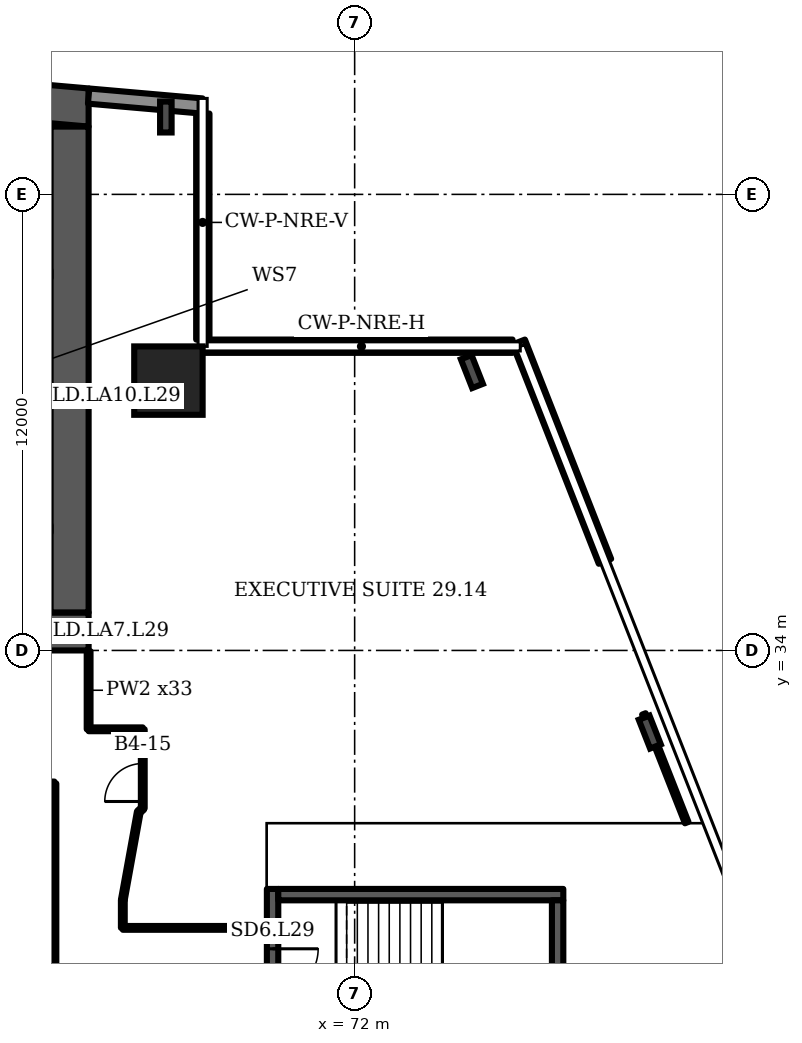
"""IFC4 building model, lengths in metres.
Left out: names, types, materials, properties, quantities, classifications, styles, units other than length and angle.
Written with IfcOpenShell. Run it as: python <this file> out.ifc"""

import sys

from ifc_helpers import new_model, si_unit, direction, frame, frame_2d, origin, origin_2d, place, context, subcontext, project, spatial, polyline, rectangle, i_section, outline, extrude, element, fill, save


model = new_model("IFC4")
c1 = context("Model", 3, precision=1e-05, world=origin(), true_north=direction((0.0, 1.0)))
c2 = subcontext(c1, "Body", "Model", "MODEL_VIEW")
j1 = project(units=[si_unit("LENGTHUNIT", "METRE"), si_unit("PLANEANGLEUNIT", "RADIAN")], contexts=[c1])
p1 = place(None, origin())
s1 = spatial("IfcSite", under=j1, at=p1, CompositionType="ELEMENT")
p2 = place(p1, origin())
s2 = spatial("IfcBuilding", under=s1, at=p2, CompositionType="ELEMENT")
p3 = place(p2, frame((0.0, 0.0, 125.5)))
s3 = spatial("IfcBuildingStorey", under=s2, at=p3, CompositionType="ELEMENT", Elevation=125.5)
p4 = place(p3, origin())
e1 = element("IfcWall", 1, at=p4, inside=s3, PredefinedType="SHEAR", context=c2, shape_type="SweptSolid", body=[
    extrude(outline(polyline([(16.0, 47.784), (40.5, 49.927), (65.0, 47.784), (65.0, 48.787), (40.5, 50.931), (16.0, 48.787), (16.0, 47.784)])), origin(), (0.0, 0.0, 1.0), 3.6),
])
p5 = place(p3, frame((16.0, 34.5, 0.0), z_axis=(0.0, 0.0, 1.0), x_axis=(1.0, 0.0, 0.0)))
e2 = element("IfcWall", 2, at=p5, inside=s3, PredefinedType="SHEAR", context=c2, shape_type="SweptSolid", body=[
    extrude(rectangle(XDim=49.0, YDim=1.0, at=frame_2d((24.5, 0.0))), origin(), (0.0, 0.0, 1.0), 3.6),
])
p6 = place(p5, frame((1.2, 0.0, 0.0)))
e3 = element("IfcOpeningElement", 3, at=p6, cuts=e2, PredefinedType="OPENING", context=c2, shape_type="SweptSolid", body=[
    extrude(rectangle(XDim=1.1, YDim=2.1, at=frame_2d((0.55, 1.05))), frame((0.0, 0.51, 0.0), z_axis=(0.0, -1.0, 0.0), x_axis=(1.0, 0.0, 0.0)), (0.0, 0.0, 1.0), 1.02),
])
p7 = place(p5, frame((5.083, 0.0, 0.0)))
e4 = element("IfcOpeningElement", 4, at=p7, cuts=e2, PredefinedType="OPENING", context=c2, shape_type="SweptSolid", body=[
    extrude(rectangle(XDim=1.1, YDim=2.1, at=frame_2d((0.55, 1.05))), frame((0.0, 0.51, 0.0), z_axis=(0.0, -1.0, 0.0), x_axis=(1.0, 0.0, 0.0)), (0.0, 0.0, 1.0), 1.02),
])
p8 = place(p5, frame((2.933, 0.0, 0.0)))
e5 = element("IfcOpeningElement", 5, at=p8, cuts=e2, PredefinedType="OPENING", context=c2, shape_type="SweptSolid", body=[
    extrude(rectangle(XDim=1.4, YDim=2.1, at=frame_2d((0.7, 1.05))), frame((0.0, 0.51, 0.0), z_axis=(0.0, -1.0, 0.0), x_axis=(1.0, 0.0, 0.0)), (0.0, 0.0, 1.0), 1.02),
])
p9 = place(p5, frame((7.65, 0.0, 0.0)))
e6 = element("IfcOpeningElement", 6, at=p9, cuts=e2, PredefinedType="OPENING", context=c2, shape_type="SweptSolid", body=[
    extrude(rectangle(XDim=1.2, YDim=2.1, at=frame_2d((0.6, 1.05))), frame((0.0, 0.51, 0.0), z_axis=(0.0, -1.0, 0.0), x_axis=(1.0, 0.0, 0.0)), (0.0, 0.0, 1.0), 1.02),
])
p10 = place(p5, frame((14.817, 0.0, 0.0)))
e7 = element("IfcOpeningElement", 7, at=p10, cuts=e2, PredefinedType="OPENING", context=c2, shape_type="SweptSolid", body=[
    extrude(rectangle(XDim=1.1, YDim=2.1, at=frame_2d((0.55, 1.05))), frame((0.0, 0.51, 0.0), z_axis=(0.0, -1.0, 0.0), x_axis=(1.0, 0.0, 0.0)), (0.0, 0.0, 1.0), 1.02),
])
p11 = place(p5, frame((19.083, 0.0, 0.0)))
e8 = element("IfcOpeningElement", 8, at=p11, cuts=e2, PredefinedType="OPENING", context=c2, shape_type="SweptSolid", body=[
    extrude(rectangle(XDim=1.1, YDim=2.1, at=frame_2d((0.55, 1.05))), frame((0.0, 0.51, 0.0), z_axis=(0.0, -1.0, 0.0), x_axis=(1.0, 0.0, 0.0)), (0.0, 0.0, 1.0), 1.02),
])
p12 = place(p5, frame((16.8, 0.0, 0.0)))
e9 = element("IfcOpeningElement", 9, at=p12, cuts=e2, PredefinedType="OPENING", context=c2, shape_type="SweptSolid", body=[
    extrude(rectangle(XDim=1.4, YDim=2.1, at=frame_2d((0.7, 1.05))), frame((0.0, 0.51, 0.0), z_axis=(0.0, -1.0, 0.0), x_axis=(1.0, 0.0, 0.0)), (0.0, 0.0, 1.0), 1.02),
])
p13 = place(p5, frame((21.817, 0.0, 0.0)))
e10 = element("IfcOpeningElement", 10, at=p13, cuts=e2, PredefinedType="OPENING", context=c2, shape_type="SweptSolid", body=[
    extrude(rectangle(XDim=1.1, YDim=2.1, at=frame_2d((0.55, 1.05))), frame((0.0, 0.51, 0.0), z_axis=(0.0, -1.0, 0.0), x_axis=(1.0, 0.0, 0.0)), (0.0, 0.0, 1.0), 1.02),
])
p14 = place(p5, frame((26.083, 0.0, 0.0)))
e11 = element("IfcOpeningElement", 11, at=p14, cuts=e2, PredefinedType="OPENING", context=c2, shape_type="SweptSolid", body=[
    extrude(rectangle(XDim=1.1, YDim=2.1, at=frame_2d((0.55, 1.05))), frame((0.0, 0.51, 0.0), z_axis=(0.0, -1.0, 0.0), x_axis=(1.0, 0.0, 0.0)), (0.0, 0.0, 1.0), 1.02),
])
p15 = place(p5, frame((33.15, 0.0, 0.0)))
e12 = element("IfcOpeningElement", 12, at=p15, cuts=e2, PredefinedType="OPENING", context=c2, shape_type="SweptSolid", body=[
    extrude(rectangle(XDim=1.2, YDim=2.1, at=frame_2d((0.6, 1.05))), frame((0.0, 0.51, 0.0), z_axis=(0.0, -1.0, 0.0), x_axis=(1.0, 0.0, 0.0)), (0.0, 0.0, 1.0), 1.02),
])
p16 = place(p5, frame((37.8, 0.0, 0.0)))
e13 = element("IfcOpeningElement", 13, at=p16, cuts=e2, PredefinedType="OPENING", context=c2, shape_type="SweptSolid", body=[
    extrude(rectangle(XDim=1.4, YDim=2.1, at=frame_2d((0.7, 1.05))), frame((0.0, 0.51, 0.0), z_axis=(0.0, -1.0, 0.0), x_axis=(1.0, 0.0, 0.0)), (0.0, 0.0, 1.0), 1.02),
])
p17 = place(p5, frame((42.817, 0.0, 0.0)))
e14 = element("IfcOpeningElement", 14, at=p17, cuts=e2, PredefinedType="OPENING", context=c2, shape_type="SweptSolid", body=[
    extrude(rectangle(XDim=1.1, YDim=2.1, at=frame_2d((0.55, 1.05))), frame((0.0, 0.51, 0.0), z_axis=(0.0, -1.0, 0.0), x_axis=(1.0, 0.0, 0.0)), (0.0, 0.0, 1.0), 1.02),
])
p18 = place(p5, frame((46.7, 0.0, 0.0)))
e15 = element("IfcOpeningElement", 15, at=p18, cuts=e2, PredefinedType="OPENING", context=c2, shape_type="SweptSolid", body=[
    extrude(rectangle(XDim=1.1, YDim=2.1, at=frame_2d((0.55, 1.05))), frame((0.0, 0.51, 0.0), z_axis=(0.0, -1.0, 0.0), x_axis=(1.0, 0.0, 0.0)), (0.0, 0.0, 1.0), 1.02),
])
p19 = place(p5, frame((44.667, 0.0, 0.0)))
e16 = element("IfcOpeningElement", 16, at=p19, cuts=e2, PredefinedType="OPENING", context=c2, shape_type="SweptSolid", body=[
    extrude(rectangle(XDim=1.4, YDim=2.1, at=frame_2d((0.7, 1.05))), frame((0.0, 0.51, 0.0), z_axis=(0.0, -1.0, 0.0), x_axis=(1.0, 0.0, 0.0)), (0.0, 0.0, 1.0), 1.02),
])
p20 = place(p3, frame((64.5, 35.0, 0.0), z_axis=(0.0, 0.0, 1.0), x_axis=(0.0, 1.0, 0.0)))
e17 = element("IfcWall", 17, at=p20, inside=s3, PredefinedType="SHEAR", context=c2, shape_type="SweptSolid", body=[
    extrude(rectangle(XDim=12.784, YDim=1.0, at=frame_2d((6.392, 0.0))), origin(), (0.0, 0.0, 1.0), 3.6),
])
p21 = place(p3, frame((67.1, 41.1, 0.0), z_axis=(0.0, 0.0, 1.0), x_axis=(1.0, 0.0, 0.0)))
e18 = element("IfcColumn", 18, at=p21, inside=s3, PredefinedType="COLUMN", context=c2, shape_type="SweptSolid", body=[
    extrude(rectangle(XDim=1.8, YDim=1.8, at=origin_2d()), origin(), (0.0, 0.0, 1.0), 3.6),
])
for number, where, z_axis, x_axis in (
    (19, (79.766, 31.853, 0.0), (0.0, 0.0, 1.0), (0.931, 0.366, 0.0)),
    (20, (75.085, 41.338, 0.0), (0.0, 0.0, 1.0), (0.931, 0.366, 0.0)),
    (21, (67.032, 48.036, 0.0), (0.0, 0.0, 1.0), (1.0, 0.0, 0.0)),
):
    element("IfcColumn", number, at=place(p3, frame(where, z_axis=z_axis, x_axis=x_axis)), inside=s3, PredefinedType="COLUMN", context=c2, shape_type="SweptSolid", body=[
        extrude(i_section(OverallWidth=0.303, OverallDepth=0.814, WebThickness=0.021, FlangeThickness=0.04, FilletRadius=0.03, at=origin_2d()), origin(), (0.0, 0.0, 1.0), 3.6),
    ])
p22 = place(p3, frame((67.983, 48.326, 0.0), z_axis=(0.0, 0.0, 1.0), x_axis=(-0.996194, 0.087168, 0.0)))
e22 = element("IfcWall", 22, at=p22, inside=s3, PredefinedType="SOLIDWALL", context=c2, shape_type="SweptSolid", body=[
    extrude(rectangle(XDim=2.994, YDim=0.4, at=frame_2d((1.497, 0.0))), origin(), (0.0, 0.0, 1.0), 3.2),
])
p23 = place(p3, frame((78.586, 36.344, 0.0), z_axis=(0.0, 0.0, 1.0), x_axis=(-0.365792, 0.930699, 0.0)))
e23 = element("IfcWall", 23, at=p23, inside=s3, PredefinedType="SOLIDWALL", context=c2, shape_type="SweptSolid", body=[
    extrude(rectangle(XDim=6.202, YDim=0.35, at=frame_2d((3.101, 0.0))), origin(), (0.0, 0.0, 1.0), 1.0),
])
p24 = place(p3, frame((76.155, 42.005, 0.0), z_axis=(0.0, 0.0, 1.0), x_axis=(-1.0, 0.0, 0.0)))
e24 = element("IfcWall", 24, at=p24, inside=s3, PredefinedType="SOLIDWALL", context=c2, shape_type="SweptSolid", body=[
    extrude(rectangle(XDim=8.155, YDim=0.35, at=frame_2d((4.078, 0.0))), origin(), (0.0, 0.0, 1.0), 1.0),
])
p25 = place(p3, frame((68.005, 42.18, 0.0), z_axis=(0.0, 0.0, 1.0), x_axis=(0.0, 1.0, 0.0)))
e25 = element("IfcWall", 25, at=p25, inside=s3, PredefinedType="SOLIDWALL", context=c2, shape_type="SweptSolid", body=[
    extrude(rectangle(XDim=5.947, YDim=0.35, at=frame_2d((2.973, 0.0))), origin(), (0.0, 0.0, 1.0), 1.0),
])
p26 = place(p3, frame((69.84, 23.375, 0.0), z_axis=(0.0, 0.0, 1.0), x_axis=(0.0, 1.0, 0.0)))
e26 = element("IfcWall", 26, at=p26, inside=s3, PredefinedType="SHEAR", context=c2, shape_type="SweptSolid", body=[
    extrude(rectangle(XDim=4.35, YDim=0.3, at=frame_2d((2.175, 0.0))), origin(), (0.0, 0.0, 1.0), 3.2),
])
p27 = place(p26, frame((1.575, 0.0, 0.0)))
e27 = element("IfcOpeningElement", 27, at=p27, cuts=e26, PredefinedType="OPENING", context=c2, shape_type="SweptSolid", body=[
    extrude(rectangle(XDim=1.2, YDim=2.1, at=frame_2d((0.6, 1.05))), frame((0.0, 0.16, 0.0), z_axis=(0.0, -1.0, 0.0), x_axis=(1.0, 0.0, 0.0)), (0.0, 0.0, 1.0), 0.32),
])
p28 = place(p3, frame((44.51, 30.5, 0.0), z_axis=(0.0, 0.0, 1.0), x_axis=(1.0, 0.0, 0.0)))
e28 = element("IfcWall", 28, at=p28, inside=s3, PredefinedType="PARTITIONING", context=c2, shape_type="SweptSolid", body=[
    extrude(rectangle(XDim=19.59, YDim=0.1, at=frame_2d((9.795, 0.0))), origin(), (0.0, 0.0, 1.0), 3.2),
])
p29 = place(p28, frame((6.41, 0.0, 0.0)))
e29 = element("IfcOpeningElement", 29, at=p29, cuts=e28, PredefinedType="OPENING", context=c2, shape_type="SweptSolid", body=[
    extrude(rectangle(XDim=1.0, YDim=2.1, at=frame_2d((0.5, 1.05))), frame((0.0, 0.06, 0.0), z_axis=(0.0, -1.0, 0.0), x_axis=(1.0, 0.0, 0.0)), (0.0, 0.0, 1.0), 0.12),
])
p30 = place(p28, frame((10.41, 0.0, 0.0)))
e30 = element("IfcOpeningElement", 30, at=p30, cuts=e28, PredefinedType="OPENING", context=c2, shape_type="SweptSolid", body=[
    extrude(rectangle(XDim=1.0, YDim=2.1, at=frame_2d((0.5, 1.05))), frame((0.0, 0.06, 0.0), z_axis=(0.0, -1.0, 0.0), x_axis=(1.0, 0.0, 0.0)), (0.0, 0.0, 1.0), 0.12),
])
p31 = place(p3, frame((64.1, 10.095, 0.0), z_axis=(0.0, 0.0, 1.0), x_axis=(0.0, 1.0, 0.0)))
e31 = element("IfcWall", 31, at=p31, inside=s3, PredefinedType="PARTITIONING", context=c2, shape_type="SweptSolid", body=[
    extrude(rectangle(XDim=20.405, YDim=0.1, at=frame_2d((10.203, 0.0))), origin(), (0.0, 0.0, 1.0), 3.2),
])
p32 = place(p31, frame((8.905, 0.0, 0.0)))
e32 = element("IfcOpeningElement", 32, at=p32, cuts=e31, PredefinedType="OPENING", context=c2, shape_type="SweptSolid", body=[
    extrude(rectangle(XDim=1.0, YDim=2.1, at=frame_2d((0.5, 1.05))), frame((0.0, 0.06, 0.0), z_axis=(0.0, -1.0, 0.0), x_axis=(1.0, 0.0, 0.0)), (0.0, 0.0, 1.0), 0.12),
])
p33 = place(p3, frame((65.0, 31.925, 0.0), z_axis=(0.0, 0.0, 1.0), x_axis=(0.0, 1.0, 0.0)))
e33 = element("IfcWall", 33, at=p33, inside=s3, PredefinedType="PARTITIONING", context=c2, shape_type="SweptSolid", body=[
    extrude(rectangle(XDim=2.055, YDim=0.1, at=frame_2d((1.027, 0.0))), origin(), (0.0, 0.0, 1.0), 3.2),
])
p34 = place(p3, frame((65.0, 31.925, 0.0), z_axis=(0.0, 0.0, 1.0), x_axis=(1.0, 0.0, 0.0)))
e34 = element("IfcWall", 34, at=p34, inside=s3, PredefinedType="PARTITIONING", context=c2, shape_type="SweptSolid", body=[
    extrude(rectangle(XDim=1.425, YDim=0.1, at=frame_2d((0.712, 0.0))), origin(), (0.0, 0.0, 1.0), 3.2),
])
p35 = place(p3, frame((65.9, 26.7, 0.0), z_axis=(0.0, 0.0, 1.0), x_axis=(0.0, 1.0, 0.0)))
e35 = element("IfcWall", 35, at=p35, inside=s3, PredefinedType="PARTITIONING", context=c2, shape_type="SweptSolid", body=[
    extrude(rectangle(XDim=0.735, YDim=0.1, at=frame_2d((0.368, 0.0))), origin(), (0.0, 0.0, 1.0), 3.2),
])
p36 = place(p3, frame((65.9, 26.7, 0.0), z_axis=(0.0, 0.0, 1.0), x_axis=(1.0, 0.0, 0.0)))
e36 = element("IfcWall", 36, at=p36, inside=s3, PredefinedType="PARTITIONING", context=c2, shape_type="SweptSolid", body=[
    extrude(rectangle(XDim=3.771, YDim=0.1, at=frame_2d((1.885, 0.0))), origin(), (0.0, 0.0, 1.0), 3.2),
])
p37 = place(p3, frame((65.9, 27.435, 0.0), z_axis=(0.0, 0.0, 1.0), x_axis=(0.178584, 0.983924, 0.0)))
e37 = element("IfcWall", 37, at=p37, inside=s3, PredefinedType="PARTITIONING", context=c2, shape_type="SweptSolid", body=[
    extrude(rectangle(XDim=2.353, YDim=0.1, at=frame_2d((1.176, 0.0))), origin(), (0.0, 0.0, 1.0), 3.2),
])
p38 = place(p3, frame((66.32, 29.75, 0.0), z_axis=(0.0, 0.0, 1.0), x_axis=(0.741581, 0.670872, 0.0)))
e38 = element("IfcWall", 38, at=p38, inside=s3, PredefinedType="PARTITIONING", context=c2, shape_type="SweptSolid", body=[
    extrude(rectangle(XDim=0.142, YDim=0.1, at=frame_2d((0.071, 0.0))), origin(), (0.0, 0.0, 1.0), 3.2),
])
p39 = place(p3, frame((66.425, 29.845, 0.0), z_axis=(0.0, 0.0, 1.0), x_axis=(0.0, 1.0, 0.0)))
e39 = element("IfcWall", 39, at=p39, inside=s3, PredefinedType="PARTITIONING", context=c2, shape_type="SweptSolid", body=[
    extrude(rectangle(XDim=2.08, YDim=0.1, at=frame_2d((1.04, 0.0))), origin(), (0.0, 0.0, 1.0), 3.2),
])
p40 = place(p39, frame((0.181, 0.0, 0.0)))
e40 = element("IfcOpeningElement", 40, at=p40, cuts=e39, PredefinedType="OPENING", context=c2, shape_type="SweptSolid", body=[
    extrude(rectangle(XDim=1.0, YDim=2.1, at=frame_2d((0.5, 1.05))), frame((0.0, 0.06, 0.0), z_axis=(0.0, -1.0, 0.0), x_axis=(1.0, 0.0, 0.0)), (0.0, 0.0, 1.0), 0.12),
])
p41 = place(p3, frame((80.737, 29.47, 0.0), z_axis=(0.0, 0.0, 1.0), x_axis=(-0.366592, 0.930378, 0.0)))
e41 = element("IfcWall", 41, at=p41, inside=s3, PredefinedType="PARTITIONING", context=c2, shape_type="SweptSolid", body=[
    extrude(rectangle(XDim=3.074, YDim=0.1, at=frame_2d((1.537, 0.0))), origin(), (0.0, 0.0, 1.0), 2.58),
])
p42 = place(p3, frame((69.99, 27.575, 0.0), z_axis=(0.0, 0.0, 1.0), x_axis=(1.0, 0.0, 0.0)))
e42 = element("IfcWall", 42, at=p42, inside=s3, PredefinedType="SHEAR", context=c2, shape_type="SweptSolid", body=[
    extrude(rectangle(XDim=7.5, YDim=0.3, at=frame_2d((3.75, 0.0))), origin(), (0.0, 0.0, 1.0), 3.2),
])
p43 = place(p3, frame((77.34, 23.675, 0.0), z_axis=(0.0, 0.0, 1.0), x_axis=(0.0, 1.0, 0.0)))
e43 = element("IfcWall", 43, at=p43, inside=s3, PredefinedType="SHEAR", context=c2, shape_type="SweptSolid", body=[
    extrude(rectangle(XDim=3.75, YDim=0.3, at=frame_2d((1.875, 0.0))), origin(), (0.0, 0.0, 1.0), 3.2),
])
p44 = place(p27, origin())
e44 = element("IfcDoor", 44, at=p44, inside=s3, OperationType="SINGLE_SWING_RIGHT", PredefinedType="DOOR", context=c2, shape_type="SweptSolid", body=[
    extrude(rectangle(XDim=1.2, YDim=2.1, at=frame_2d((0.6, 1.05))), frame((0.0, 0.025, 0.0), z_axis=(0.0, -1.0, 0.0), x_axis=(1.0, 0.0, 0.0)), (0.0, 0.0, 1.0), 0.05),
])
fill(e27, e44)
p45 = place(p40, origin())
e45 = element("IfcDoor", 45, at=p45, inside=s3, OperationType="SINGLE_SWING_LEFT", PredefinedType="DOOR", context=c2, shape_type="SweptSolid", body=[
    extrude(rectangle(XDim=1.0, YDim=2.1, at=frame_2d((0.5, 1.05))), frame((0.0, 0.025, 0.0), z_axis=(0.0, -1.0, 0.0), x_axis=(1.0, 0.0, 0.0)), (0.0, 0.0, 1.0), 0.05),
])
fill(e40, e45)
save(model, sys.argv[1])
